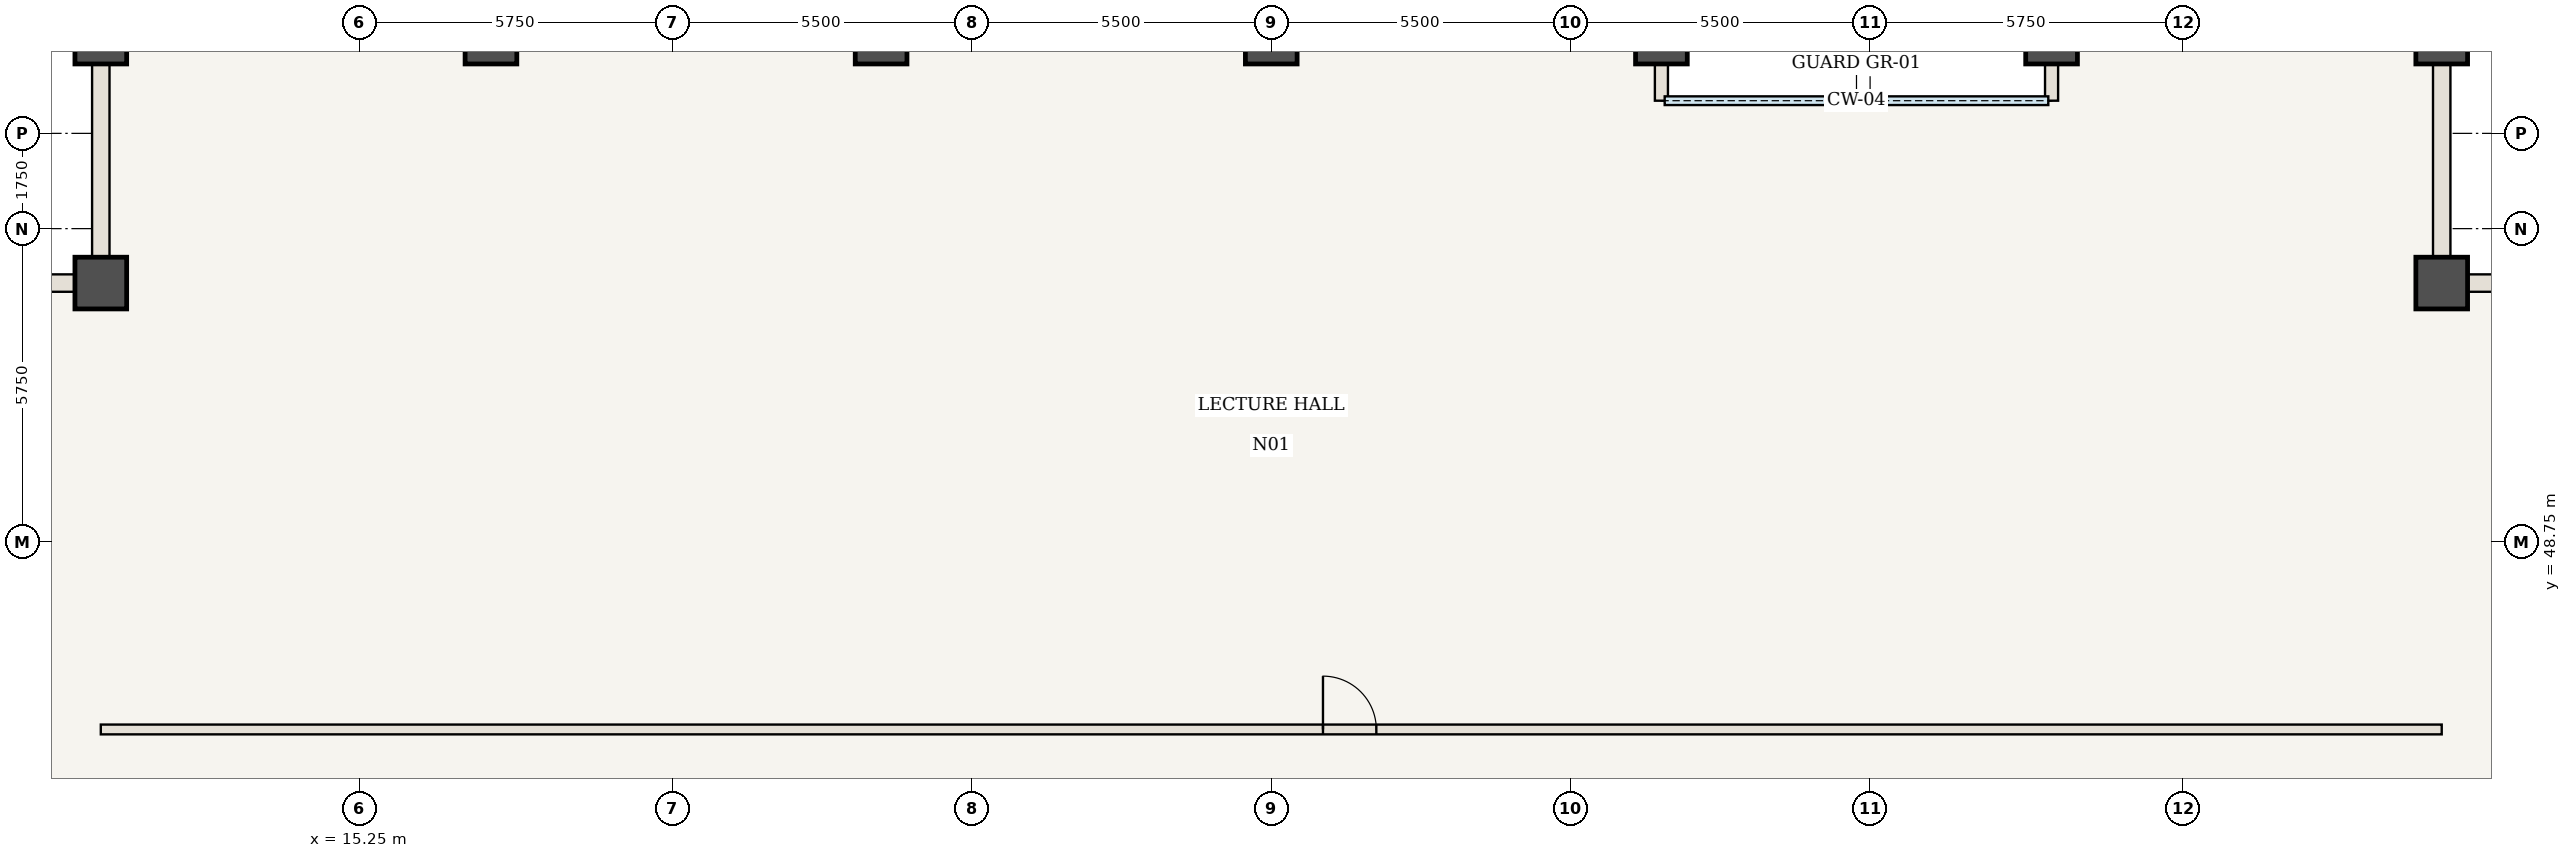
"""IFC4 building model, lengths in metres.
Left out: names, types, materials, properties, quantities, classifications, styles, units other than length and angle.
Written with IfcOpenShell. Run it as: python <this file> out.ifc"""

import sys

from ifc_helpers import new_model, si_unit, direction, frame, frame_2d, origin, origin_2d, place, context, subcontext, project, spatial, rectangle, extrude, element, fill, save


model = new_model("IFC4")
c1 = context("Model", 3, precision=1e-05, world=origin(), true_north=direction((0.0, 1.0)))
c2 = subcontext(c1, "Body", "Model", "MODEL_VIEW")
j1 = project(units=[si_unit("LENGTHUNIT", "METRE"), si_unit("PLANEANGLEUNIT", "RADIAN")], contexts=[c1])
p1 = place(None, origin())
s1 = spatial("IfcSite", under=j1, at=p1, CompositionType="ELEMENT")
p2 = place(p1, origin())
s2 = spatial("IfcBuilding", under=s1, at=p2, CompositionType="ELEMENT")
p3 = place(p2, frame((0.0, 0.0, 137.55)))
s3 = spatial("IfcBuildingStorey", under=s2, at=p3, CompositionType="ELEMENT", Elevation=137.55)
for number, where, z_axis, x_axis in (
    (1, (53.5, 53.5, 0.0), (0.0, 0.0, 1.0), (1.0, 0.0, 0.0)),
    (2, (53.5, 58.0, 0.0), (0.0, 0.0, 1.0), (1.0, 0.0, 0.0)),
    (3, (10.5, 58.0, 0.0), (0.0, 0.0, 1.0), (1.0, 0.0, 0.0)),
    (4, (10.5, 53.5, 0.0), (0.0, 0.0, 1.0), (1.0, 0.0, 0.0)),
    (5, (17.667, 58.0, 0.0), (0.0, 0.0, 1.0), (1.0, 0.0, 0.0)),
    (6, (24.833, 58.0, 0.0), (0.0, 0.0, 1.0), (1.0, 0.0, 0.0)),
    (7, (32.0, 58.0, 0.0), (0.0, 0.0, 1.0), (1.0, 0.0, 0.0)),
    (8, (39.167, 58.0, 0.0), (0.0, 0.0, 1.0), (1.0, 0.0, 0.0)),
    (9, (46.333, 58.0, 0.0), (0.0, 0.0, 1.0), (1.0, 0.0, 0.0)),
):
    element("IfcColumn", number, at=place(p3, frame(where, z_axis=z_axis, x_axis=x_axis)), inside=s3, PredefinedType="COLUMN", context=c2, shape_type="SweptSolid", body=[
        extrude(rectangle(XDim=0.95, YDim=0.95, at=origin_2d()), origin(), (0.0, 0.0, 1.0), 3.85),
    ])
p4 = place(p3, frame((10.5, 45.3, 0.0), z_axis=(0.0, 0.0, 1.0), x_axis=(1.0, 0.0, 0.0)))
e10 = element("IfcWall", 10, at=p4, inside=s3, PredefinedType="STANDARD", context=c2, shape_type="SweptSolid", body=[
    extrude(rectangle(XDim=43.0, YDim=0.18, at=frame_2d((21.5, 0.0))), origin(), (0.0, 0.0, 1.0), 3.685),
])
p5 = place(p4, frame((22.45, 0.0, 0.0)))
e11 = element("IfcOpeningElement", 11, at=p5, cuts=e10, PredefinedType="OPENING", context=c2, shape_type="SweptSolid", body=[
    extrude(rectangle(XDim=0.98, YDim=2.2, at=frame_2d((0.49, 1.1))), frame((0.0, 0.1, 0.0), z_axis=(0.0, -1.0, 0.0), x_axis=(1.0, 0.0, 0.0)), (0.0, 0.0, 1.0), 0.2),
])
for number, where, z_axis, x_axis in (
    (12, (39.167, 58.0, 0.0), (0.0, 0.0, 1.0), (0.0, -1.0, 0.0)),
    (13, (46.333, 58.0, 0.0), (0.0, 0.0, 1.0), (0.0, -1.0, 0.0)),
):
    element("IfcWall", number, at=place(p3, frame(where, z_axis=z_axis, x_axis=x_axis)), inside=s3, PredefinedType="USERDEFINED", context=c2, shape_type="SweptSolid", body=[
        extrude(rectangle(XDim=1.15, YDim=0.24, at=frame_2d((0.575, 0.0))), origin(), (0.0, 0.0, 1.0), 2.885),
    ])
for number, where, z_axis, x_axis in (
    (14, (53.5, 53.5, 0.0), (0.0, 0.0, 1.0), (1.0, 0.0, 0.0)),
    (15, (53.5, 58.0, 0.0), (0.0, 0.0, 1.0), (0.0, -1.0, 0.0)),
    (16, (10.5, 53.5, 0.0), (0.0, 0.0, 1.0), (0.0, 1.0, 0.0)),
    (17, (6.0, 53.5, 0.0), (0.0, 0.0, 1.0), (1.0, 0.0, 0.0)),
):
    element("IfcWall", number, at=place(p3, frame(where, z_axis=z_axis, x_axis=x_axis)), inside=s3, PredefinedType="USERDEFINED", context=c2, shape_type="SweptSolid", body=[
        extrude(rectangle(XDim=4.5, YDim=0.32, at=frame_2d((2.25, 0.0))), origin(), (0.0, 0.0, 1.0), 2.885),
    ])
p6 = place(p5, origin())
e18 = element("IfcDoor", 18, at=p6, inside=s3, OperationType="SINGLE_SWING_LEFT", PredefinedType="DOOR", context=c2, shape_type="SweptSolid", body=[
    extrude(rectangle(XDim=0.98, YDim=2.2, at=frame_2d((0.49, 1.1))), frame((0.0, 0.025, 0.0), z_axis=(0.0, -1.0, 0.0), x_axis=(1.0, 0.0, 0.0)), (0.0, 0.0, 1.0), 0.05),
])
fill(e11, e18)
save(model, sys.argv[1])
